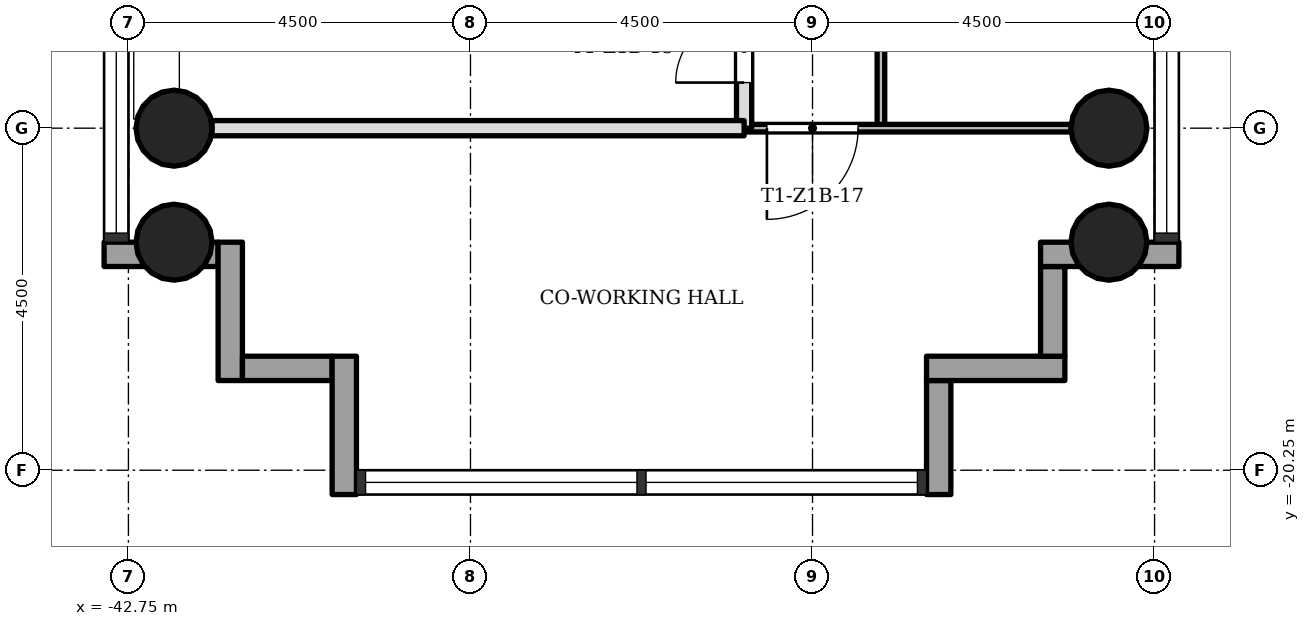
"""IFC4 building model, lengths in metres.
Left out: names, types, materials, properties, quantities, classifications, styles, units other than length and angle.
Written with IfcOpenShell. Run it as: python <this file> out.ifc"""

import sys

from ifc_helpers import new_model, si_unit, direction, frame, frame_2d, origin, origin_2d, place, context, subcontext, project, spatial, rectangle, hollow_circle, extrude, element, fill, save


model = new_model("IFC4")
c1 = context("Model", 3, precision=1e-05, world=origin(), true_north=direction((0.0, 1.0)))
c2 = subcontext(c1, "Body", "Model", "MODEL_VIEW")
j1 = project(units=[si_unit("LENGTHUNIT", "METRE"), si_unit("PLANEANGLEUNIT", "RADIAN")], contexts=[c1])
p1 = place(None, origin())
s1 = spatial("IfcSite", under=j1, at=p1, CompositionType="ELEMENT")
p2 = place(p1, origin())
s2 = spatial("IfcBuilding", under=s1, at=p2, CompositionType="ELEMENT")
p3 = place(p2, frame((0.0, 0.0, 41.5)))
s3 = spatial("IfcBuildingStorey", under=s2, at=p3, CompositionType="ELEMENT", Elevation=41.5)
for number, where, z_axis, x_axis in (
    (1, (-42.15, -15.75, 0.0), (0.0, 0.0, 1.0), (1.0, 0.0, 0.0)),
    (2, (-29.85, -15.75, 0.0), (0.0, 0.0, 1.0), (1.0, 0.0, 0.0)),
    (3, (-42.15, -17.25, 0.0), (0.0, 0.0, 1.0), (1.0, 0.0, 0.0)),
    (4, (-29.85, -17.25, 0.0), (0.0, 0.0, 1.0), (1.0, 0.0, 0.0)),
):
    element("IfcColumn", number, at=place(p3, frame(where, z_axis=z_axis, x_axis=x_axis)), inside=s3, PredefinedType="COLUMN", context=c2, shape_type="SweptSolid", body=[
        extrude(hollow_circle(Radius=0.5, WallThickness=0.036, at=origin_2d()), origin(), (0.0, 0.0, 1.0), 3.4),
    ])
p4 = place(p3, frame((-43.07, -17.41, -0.3), z_axis=(0.0, 0.0, 1.0), x_axis=(1.0, 0.0, 0.0)))
e5 = element("IfcWall", 5, at=p4, inside=s3, PredefinedType="STANDARD", context=c2, shape_type="SweptSolid", body=[
    extrude(rectangle(XDim=1.5, YDim=0.32, at=frame_2d((0.75, 0.0))), origin(), (0.0, 0.0, 1.0), 3.4),
])
p5 = place(p3, frame((-41.41, -17.25, -0.3), z_axis=(0.0, 0.0, 1.0), x_axis=(0.0, -1.0, 0.0)))
e6 = element("IfcWall", 6, at=p5, inside=s3, PredefinedType="STANDARD", context=c2, shape_type="SweptSolid", body=[
    extrude(rectangle(XDim=1.82, YDim=0.32, at=frame_2d((0.91, 0.0))), origin(), (0.0, 0.0, 1.0), 3.4),
])
p6 = place(p3, frame((-41.25, -18.91, -0.3), z_axis=(0.0, 0.0, 1.0), x_axis=(1.0, 0.0, 0.0)))
e7 = element("IfcWall", 7, at=p6, inside=s3, PredefinedType="STANDARD", context=c2, shape_type="SweptSolid", body=[
    extrude(rectangle(XDim=1.18, YDim=0.32, at=frame_2d((0.59, 0.0))), origin(), (0.0, 0.0, 1.0), 3.4),
])
p7 = place(p3, frame((-39.91, -18.75, -0.3), z_axis=(0.0, 0.0, 1.0), x_axis=(0.0, -1.0, 0.0)))
e8 = element("IfcWall", 8, at=p7, inside=s3, PredefinedType="STANDARD", context=c2, shape_type="SweptSolid", body=[
    extrude(rectangle(XDim=1.82, YDim=0.32, at=frame_2d((0.91, 0.0))), origin(), (0.0, 0.0, 1.0), 3.4),
])
p8 = place(p3, frame((-32.09, -20.57, -0.3), z_axis=(0.0, 0.0, 1.0), x_axis=(0.0, 1.0, 0.0)))
e9 = element("IfcWall", 9, at=p8, inside=s3, PredefinedType="STANDARD", context=c2, shape_type="SweptSolid", body=[
    extrude(rectangle(XDim=1.5, YDim=0.32, at=frame_2d((0.75, 0.0))), origin(), (0.0, 0.0, 1.0), 3.4),
])
p9 = place(p3, frame((-32.25, -18.91, -0.3), z_axis=(0.0, 0.0, 1.0), x_axis=(1.0, 0.0, 0.0)))
e10 = element("IfcWall", 10, at=p9, inside=s3, PredefinedType="STANDARD", context=c2, shape_type="SweptSolid", body=[
    extrude(rectangle(XDim=1.82, YDim=0.32, at=frame_2d((0.91, 0.0))), origin(), (0.0, 0.0, 1.0), 3.4),
])
p10 = place(p3, frame((-30.59, -18.75, -0.3), z_axis=(0.0, 0.0, 1.0), x_axis=(0.0, 1.0, 0.0)))
e11 = element("IfcWall", 11, at=p10, inside=s3, PredefinedType="STANDARD", context=c2, shape_type="SweptSolid", body=[
    extrude(rectangle(XDim=1.18, YDim=0.32, at=frame_2d((0.59, 0.0))), origin(), (0.0, 0.0, 1.0), 3.4),
])
p11 = place(p3, frame((-30.75, -17.41, -0.3), z_axis=(0.0, 0.0, 1.0), x_axis=(1.0, 0.0, 0.0)))
e12 = element("IfcWall", 12, at=p11, inside=s3, PredefinedType="STANDARD", context=c2, shape_type="SweptSolid", body=[
    extrude(rectangle(XDim=1.82, YDim=0.32, at=frame_2d((0.91, 0.0))), origin(), (0.0, 0.0, 1.0), 3.4),
])
p12 = place(p3, frame((-34.65, -15.75, 0.0), z_axis=(0.0, 0.0, 1.0), x_axis=(0.0, 1.0, 0.0)))
e13 = element("IfcWall", 13, at=p12, inside=s3, PredefinedType="SOLIDWALL", context=c2, shape_type="SweptSolid", body=[
    extrude(rectangle(XDim=4.5, YDim=0.2, at=frame_2d((2.25, 0.0))), origin(), (0.0, 0.0, 1.0), 3.0),
])
p13 = place(p12, frame((0.6, 0.0, 0.0)))
e14 = element("IfcOpeningElement", 14, at=p13, cuts=e13, PredefinedType="OPENING", context=c2, shape_type="SweptSolid", body=[
    extrude(rectangle(XDim=0.9, YDim=2.1, at=frame_2d((0.45, 1.05))), frame((0.0, 0.11, 0.0), z_axis=(0.0, -1.0, 0.0), x_axis=(1.0, 0.0, 0.0)), (0.0, 0.0, 1.0), 0.22),
])
p14 = place(p3, frame((-32.85, -15.75, 0.0), z_axis=(0.0, 0.0, 1.0), x_axis=(0.0, 1.0, 0.0)))
e15 = element("IfcWall", 15, at=p14, inside=s3, PredefinedType="PARTITIONING", context=c2, shape_type="SweptSolid", body=[
    extrude(rectangle(XDim=9.0, YDim=0.1, at=frame_2d((4.5, 0.0))), origin(), (0.0, 0.0, 1.0), 3.0),
])
p15 = place(p14, frame((6.3, 0.0, 0.0)))
e16 = element("IfcOpeningElement", 16, at=p15, cuts=e15, PredefinedType="OPENING", context=c2, shape_type="SweptSolid", body=[
    extrude(rectangle(XDim=0.9, YDim=2.1, at=frame_2d((0.45, 1.05))), frame((0.0, 0.06, 0.0), z_axis=(0.0, -1.0, 0.0), x_axis=(1.0, 0.0, 0.0)), (0.0, 0.0, 1.0), 0.12),
])
p16 = place(p14, frame((1.8, 0.0, 0.0)))
e17 = element("IfcOpeningElement", 17, at=p16, cuts=e15, PredefinedType="OPENING", context=c2, shape_type="SweptSolid", body=[
    extrude(rectangle(XDim=0.9, YDim=2.1, at=frame_2d((0.45, 1.05))), frame((0.0, 0.06, 0.0), z_axis=(0.0, -1.0, 0.0), x_axis=(1.0, 0.0, 0.0)), (0.0, 0.0, 1.0), 0.12),
])
p17 = place(p3, frame((-34.65, -15.75, 0.0), z_axis=(0.0, 0.0, 1.0), x_axis=(1.0, 0.0, 0.0)))
e18 = element("IfcWall", 18, at=p17, inside=s3, PredefinedType="PARTITIONING", context=c2, shape_type="SweptSolid", body=[
    extrude(rectangle(XDim=4.3, YDim=0.1, at=frame_2d((2.15, 0.0))), origin(), (0.0, 0.0, 1.0), 3.0),
])
p18 = place(p17, frame((0.3, 0.0, 0.0)))
e19 = element("IfcOpeningElement", 19, at=p18, cuts=e18, PredefinedType="OPENING", context=c2, shape_type="SweptSolid", body=[
    extrude(rectangle(XDim=1.2, YDim=2.1, at=frame_2d((0.6, 1.05))), frame((0.0, 0.06, 0.0), z_axis=(0.0, -1.0, 0.0), x_axis=(1.0, 0.0, 0.0)), (0.0, 0.0, 1.0), 0.12),
])
p19 = place(p3, frame((-41.65, -15.75, 0.0), z_axis=(0.0, 0.0, 1.0), x_axis=(1.0, 0.0, 0.0)))
e20 = element("IfcWall", 20, at=p19, inside=s3, PredefinedType="SOLIDWALL", context=c2, shape_type="SweptSolid", body=[
    extrude(rectangle(XDim=7.0, YDim=0.2, at=frame_2d((3.5, 0.0))), origin(), (0.0, 0.0, 1.0), 3.0),
])
p20 = place(p13, origin())
e21 = element("IfcDoor", 21, at=p20, inside=s3, OperationType="SINGLE_SWING_RIGHT", PredefinedType="DOOR", context=c2, shape_type="SweptSolid", body=[
    extrude(rectangle(XDim=0.9, YDim=2.1, at=frame_2d((0.45, 1.05))), frame((0.0, 0.025, 0.0), z_axis=(0.0, -1.0, 0.0), x_axis=(1.0, 0.0, 0.0)), (0.0, 0.0, 1.0), 0.05),
])
fill(e14, e21)
p21 = place(p18, origin())
e22 = element("IfcDoor", 22, at=p21, inside=s3, OperationType="SINGLE_SWING_LEFT", PredefinedType="DOOR", context=c2, shape_type="SweptSolid", body=[
    extrude(rectangle(XDim=1.2, YDim=2.1, at=frame_2d((0.6, 1.05))), frame((0.0, 0.025, 0.0), z_axis=(0.0, -1.0, 0.0), x_axis=(1.0, 0.0, 0.0)), (0.0, 0.0, 1.0), 0.05),
])
fill(e19, e22)
save(model, sys.argv[1])
